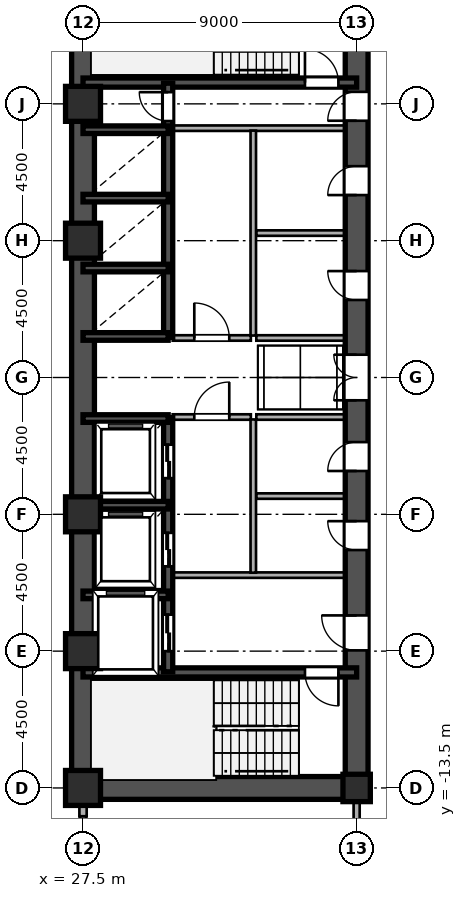
"""IFC4 building model, lengths in metres.
Left out: names, types, materials, properties, quantities, classifications, styles, units other than length and angle.
Written with IfcOpenShell. Run it as: python <this file> out.ifc"""

import sys

from ifc_helpers import new_model, si_unit, direction, frame, frame_2d, origin, origin_2d, place, context, subcontext, project, spatial, rectangle, hollow_rectangle, i_section, extrude, source, transform, mapped, element, fill, save


model = new_model("IFC4")
c1 = context("Model", 3, precision=1e-05, world=origin(), true_north=direction((0.0, 1.0)))
c2 = subcontext(c1, "Body", "Model", "MODEL_VIEW")
j1 = project(units=[si_unit("LENGTHUNIT", "METRE"), si_unit("PLANEANGLEUNIT", "RADIAN")], contexts=[c1])
p1 = place(None, origin())
s1 = spatial("IfcSite", under=j1, at=p1, CompositionType="ELEMENT")
p2 = place(p1, origin())
s2 = spatial("IfcBuilding", under=s1, at=p2, CompositionType="ELEMENT")
p3 = place(p2, frame((0.0, 0.0, 47.7)))
s3 = spatial("IfcBuildingStorey", under=s2, at=p3, CompositionType="ELEMENT", Elevation=47.7)
m1 = source(origin(), c2, "Body", "SweptSolid", [
    extrude(hollow_rectangle(XDim=1.15, YDim=1.15, WallThickness=0.048, at=origin_2d()), origin(), (0.0, 0.0, 1.0), 3.6),
])
for number, where, z_axis, x_axis in (
    (1, (27.5, -13.5, 0.0), (0.0, 0.0, 1.0), (1.0, 0.0, 0.0)),
    (2, (27.5, -9.0, 0.0), (0.0, 0.0, 1.0), (1.0, 0.0, 0.0)),
    (3, (27.5, -4.5, 0.0), (0.0, 0.0, 1.0), (1.0, 0.0, 0.0)),
    (4, (27.5, 4.5, 0.0), (0.0, 0.0, 1.0), (1.0, 0.0, 0.0)),
    (5, (27.5, 9.0, 0.0), (0.0, 0.0, 1.0), (1.0, 0.0, 0.0)),
):
    element("IfcColumn", number, at=place(p3, frame(where, z_axis=z_axis, x_axis=x_axis)), inside=s3, PredefinedType="COLUMN", context=c2, shape_type="MappedRepresentation", body=[
        mapped(m1, transform((0.0, 0.0, 0.0), scale=1.0)),
    ])
m2 = source(origin(), c2, "Body", "SweptSolid", [
    extrude(i_section(OverallWidth=0.9, OverallDepth=0.9, WebThickness=0.036, FlangeThickness=0.055, at=origin_2d()), origin(), (0.0, 0.0, 1.0), 3.6),
])
p4 = place(p3, frame((36.5, -13.5, 0.0), z_axis=(0.0, 0.0, 1.0), x_axis=(1.0, 0.0, 0.0)))
e6 = element("IfcColumn", 6, at=p4, inside=s3, PredefinedType="COLUMN", context=c2, shape_type="MappedRepresentation", body=[
    mapped(m2, transform((0.0, 0.0, 0.0), scale=1.0)),
])
p5 = place(p3, frame((27.5, -14.43, 0.0), z_axis=(0.0, 0.0, 1.0), x_axis=(0.0, 1.0, 0.0)))
e7 = element("IfcWall", 7, at=p5, inside=s3, PredefinedType="SOLIDWALL", context=c2, shape_type="SweptSolid", body=[
    extrude(rectangle(XDim=0.55, YDim=0.24, at=frame_2d((0.275, 0.0))), origin(), (0.0, 0.0, 1.0), 2.88),
])
for number, where, z_axis, x_axis in (
    (8, (27.5, -13.5, 0.0), (0.0, 0.0, 1.0), (0.0, 1.0, 0.0)),
    (9, (27.5, 1.3, 0.0), (0.0, 0.0, 1.0), (0.0, 1.0, 0.0)),
):
    element("IfcWall", number, at=place(p3, frame(where, z_axis=z_axis, x_axis=x_axis)), inside=s3, PredefinedType="SHEAR", context=c2, shape_type="SweptSolid", body=[
        extrude(rectangle(XDim=12.2, YDim=0.75, at=frame_2d((6.1, 0.0))), origin(), (0.0, 0.0, 1.0), 3.38),
    ])
p6 = place(p3, frame((27.5, -1.3, 0.0), z_axis=(0.0, 0.0, 1.0), x_axis=(0.0, 1.0, 0.0)))
e10 = element("IfcWall", 10, at=p6, inside=s3, PredefinedType="SHEAR", context=c2, shape_type="SweptSolid", body=[
    extrude(rectangle(XDim=2.6, YDim=0.75, at=frame_2d((1.3, 0.0))), origin(), (0.0, 0.0, 1.0), 3.38),
])
p7 = place(p3, frame((27.5, -13.5, 0.0), z_axis=(0.0, 0.0, 1.0), x_axis=(1.0, 0.0, 0.0)))
e11 = element("IfcWall", 11, at=p7, inside=s3, PredefinedType="SHEAR", context=c2, shape_type="SweptSolid", body=[
    extrude(rectangle(XDim=9.0, YDim=0.75, at=frame_2d((4.5, 0.0))), origin(), (0.0, 0.0, 1.0), 3.38),
])
p8 = place(p3, frame((36.5, -13.65, 0.0), z_axis=(0.0, 0.0, 1.0), x_axis=(0.0, 1.0, 0.0)))
e12 = element("IfcWall", 12, at=p8, inside=s3, PredefinedType="SHEAR", context=c2, shape_type="SweptSolid", body=[
    extrude(rectangle(XDim=7.15, YDim=0.75, at=frame_2d((3.575, 0.0))), origin(), (0.0, 0.0, 1.0), 3.38),
])
p9 = place(p8, frame((4.675, 0.0, 0.0)))
e13 = element("IfcOpeningElement", 13, at=p9, cuts=e12, PredefinedType="OPENING", context=c2, shape_type="SweptSolid", body=[
    extrude(rectangle(XDim=1.15, YDim=2.2, at=frame_2d((0.575, 1.1))), frame((0.0, 0.385, 0.0), z_axis=(0.0, -1.0, 0.0), x_axis=(1.0, 0.0, 0.0)), (0.0, 0.0, 1.0), 0.77),
])
p10 = place(p3, frame((36.5, -1.3, 0.0), z_axis=(0.0, 0.0, 1.0), x_axis=(0.0, 1.0, 0.0)))
e14 = element("IfcWall", 14, at=p10, inside=s3, PredefinedType="SHEAR", context=c2, shape_type="SweptSolid", body=[
    extrude(rectangle(XDim=2.6, YDim=0.75, at=frame_2d((1.3, 0.0))), origin(), (0.0, 0.0, 1.0), 3.38),
])
p11 = place(p10, frame((0.55, 0.0, 0.0)))
e15 = element("IfcOpeningElement", 15, at=p11, cuts=e14, PredefinedType="OPENING", context=c2, shape_type="SweptSolid", body=[
    extrude(rectangle(XDim=1.5, YDim=2.3, at=frame_2d((0.75, 1.15))), frame((0.0, 0.385, 0.0), z_axis=(0.0, -1.0, 0.0), x_axis=(1.0, 0.0, 0.0)), (0.0, 0.0, 1.0), 0.77),
])
p12 = place(p3, frame((36.5, 8.2, 0.0), z_axis=(0.0, 0.0, 1.0), x_axis=(0.0, 1.0, 0.0)))
e16 = element("IfcWall", 16, at=p12, inside=s3, PredefinedType="SHEAR", context=c2, shape_type="SweptSolid", body=[
    extrude(rectangle(XDim=5.45, YDim=0.75, at=frame_2d((2.725, 0.0))), origin(), (0.0, 0.0, 1.0), 3.38),
])
p13 = place(p12, frame((0.245, 0.0, 0.0)))
e17 = element("IfcOpeningElement", 17, at=p13, cuts=e16, PredefinedType="OPENING", context=c2, shape_type="SweptSolid", body=[
    extrude(rectangle(XDim=0.95, YDim=2.15, at=frame_2d((0.475, 1.075))), frame((0.0, 0.385, 0.0), z_axis=(0.0, -1.0, 0.0), x_axis=(1.0, 0.0, 0.0)), (0.0, 0.0, 1.0), 0.77),
])
p14 = place(p3, frame((36.5, -6.5, 0.0), z_axis=(0.0, 0.0, 1.0), x_axis=(0.0, 1.0, 0.0)))
e18 = element("IfcWall", 18, at=p14, inside=s3, PredefinedType="SHEAR", context=c2, shape_type="SweptSolid", body=[
    extrude(rectangle(XDim=2.6, YDim=0.75, at=frame_2d((1.3, 0.0))), origin(), (0.0, 0.0, 1.0), 3.38),
])
p15 = place(p14, frame((0.825, 0.0, 0.0)))
e19 = element("IfcOpeningElement", 19, at=p15, cuts=e18, PredefinedType="OPENING", context=c2, shape_type="SweptSolid", body=[
    extrude(rectangle(XDim=0.95, YDim=2.15, at=frame_2d((0.475, 1.075))), frame((0.0, 0.385, 0.0), z_axis=(0.0, -1.0, 0.0), x_axis=(1.0, 0.0, 0.0)), (0.0, 0.0, 1.0), 0.77),
])
p16 = place(p3, frame((36.5, -3.9, 0.0), z_axis=(0.0, 0.0, 1.0), x_axis=(0.0, 1.0, 0.0)))
e20 = element("IfcWall", 20, at=p16, inside=s3, PredefinedType="SHEAR", context=c2, shape_type="SweptSolid", body=[
    extrude(rectangle(XDim=2.6, YDim=0.75, at=frame_2d((1.3, 0.0))), origin(), (0.0, 0.0, 1.0), 3.38),
])
p17 = place(p16, frame((0.825, 0.0, 0.0)))
e21 = element("IfcOpeningElement", 21, at=p17, cuts=e20, PredefinedType="OPENING", context=c2, shape_type="SweptSolid", body=[
    extrude(rectangle(XDim=0.95, YDim=2.15, at=frame_2d((0.475, 1.075))), frame((0.0, 0.385, 0.0), z_axis=(0.0, -1.0, 0.0), x_axis=(1.0, 0.0, 0.0)), (0.0, 0.0, 1.0), 0.77),
])
p18 = place(p3, frame((36.5, 1.3, 0.0), z_axis=(0.0, 0.0, 1.0), x_axis=(0.0, 1.0, 0.0)))
e22 = element("IfcWall", 22, at=p18, inside=s3, PredefinedType="SHEAR", context=c2, shape_type="SweptSolid", body=[
    extrude(rectangle(XDim=3.45, YDim=0.75, at=frame_2d((1.725, 0.0))), origin(), (0.0, 0.0, 1.0), 3.38),
])
p19 = place(p18, frame((1.25, 0.0, 0.0)))
e23 = element("IfcOpeningElement", 23, at=p19, cuts=e22, PredefinedType="OPENING", context=c2, shape_type="SweptSolid", body=[
    extrude(rectangle(XDim=0.95, YDim=2.15, at=frame_2d((0.475, 1.075))), frame((0.0, 0.385, 0.0), z_axis=(0.0, -1.0, 0.0), x_axis=(1.0, 0.0, 0.0)), (0.0, 0.0, 1.0), 0.77),
])
p20 = place(p3, frame((36.5, 4.75, 0.0), z_axis=(0.0, 0.0, 1.0), x_axis=(0.0, 1.0, 0.0)))
e24 = element("IfcWall", 24, at=p20, inside=s3, PredefinedType="SHEAR", context=c2, shape_type="SweptSolid", body=[
    extrude(rectangle(XDim=3.45, YDim=0.75, at=frame_2d((1.725, 0.0))), origin(), (0.0, 0.0, 1.0), 3.38),
])
p21 = place(p20, frame((1.25, 0.0, 0.0)))
e25 = element("IfcOpeningElement", 25, at=p21, cuts=e24, PredefinedType="OPENING", context=c2, shape_type="SweptSolid", body=[
    extrude(rectangle(XDim=0.95, YDim=2.15, at=frame_2d((0.475, 1.075))), frame((0.0, 0.385, 0.0), z_axis=(0.0, -1.0, 0.0), x_axis=(1.0, 0.0, 0.0)), (0.0, 0.0, 1.0), 0.77),
])
p22 = place(p3, frame((27.5, -9.7, 0.0), z_axis=(0.0, 0.0, 1.0), x_axis=(1.0, 0.0, 0.0)))
e26 = element("IfcWall", 26, at=p22, inside=s3, PredefinedType="SHEAR", context=c2, shape_type="SweptSolid", body=[
    extrude(rectangle(XDim=9.0, YDim=0.3, at=frame_2d((4.5, 0.0))), origin(), (0.0, 0.0, 1.0), 3.38),
])
p23 = place(p22, frame((7.3, 0.0, 0.0)))
e27 = element("IfcOpeningElement", 27, at=p23, cuts=e26, PredefinedType="OPENING", context=c2, shape_type="SweptSolid", body=[
    extrude(rectangle(XDim=1.1, YDim=2.2, at=frame_2d((0.55, 1.1))), frame((0.0, 0.16, 0.0), z_axis=(0.0, -1.0, 0.0), x_axis=(1.0, 0.0, 0.0)), (0.0, 0.0, 1.0), 0.32),
])
p24 = place(p3, frame((27.5, 9.7, 0.0), z_axis=(0.0, 0.0, 1.0), x_axis=(1.0, 0.0, 0.0)))
e28 = element("IfcWall", 28, at=p24, inside=s3, PredefinedType="SHEAR", context=c2, shape_type="SweptSolid", body=[
    extrude(rectangle(XDim=9.0, YDim=0.3, at=frame_2d((4.5, 0.0))), origin(), (0.0, 0.0, 1.0), 3.38),
])
p25 = place(p24, frame((7.3, 0.0, 0.0)))
e29 = element("IfcOpeningElement", 29, at=p25, cuts=e28, PredefinedType="OPENING", context=c2, shape_type="SweptSolid", body=[
    extrude(rectangle(XDim=1.1, YDim=2.2, at=frame_2d((0.55, 1.1))), frame((0.0, 0.16, 0.0), z_axis=(0.0, -1.0, 0.0), x_axis=(1.0, 0.0, 0.0)), (0.0, 0.0, 1.0), 0.32),
])
for number, where, z_axis, x_axis in (
    (30, (27.5, -7.15, 0.0), (0.0, 0.0, 1.0), (1.0, 0.0, 0.0)),
    (31, (27.5, -4.2, 0.0), (0.0, 0.0, 1.0), (1.0, 0.0, 0.0)),
    (32, (27.5, -1.35, 0.0), (0.0, 0.0, 1.0), (1.0, 0.0, 0.0)),
    (33, (27.5, 1.35, 0.0), (0.0, 0.0, 1.0), (1.0, 0.0, 0.0)),
    (34, (27.5, 3.6, 0.0), (0.0, 0.0, 1.0), (1.0, 0.0, 0.0)),
    (35, (27.5, 5.9, 0.0), (0.0, 0.0, 1.0), (1.0, 0.0, 0.0)),
    (36, (27.5, 8.15, 0.0), (0.0, 0.0, 1.0), (1.0, 0.0, 0.0)),
):
    element("IfcWall", number, at=place(p3, frame(where, z_axis=z_axis, x_axis=x_axis)), inside=s3, PredefinedType="SHEAR", context=c2, shape_type="SweptSolid", body=[
        extrude(rectangle(XDim=2.8, YDim=0.25, at=frame_2d((1.4, 0.0))), origin(), (0.0, 0.0, 1.0), 3.38),
    ])
p26 = place(p3, frame((30.3, -9.68, 0.0), z_axis=(0.0, 0.0, 1.0), x_axis=(0.0, 1.0, 0.0)))
e37 = element("IfcWall", 37, at=p26, inside=s3, PredefinedType="SHEAR", context=c2, shape_type="SweptSolid", body=[
    extrude(rectangle(XDim=2.56, YDim=0.3, at=frame_2d((1.28, 0.0))), origin(), (0.0, 0.0, 1.0), 3.38),
])
p27 = place(p26, frame((0.68, 0.0, 0.0)))
e38 = element("IfcOpeningElement", 38, at=p27, cuts=e37, PredefinedType="OPENING", context=c2, shape_type="SweptSolid", body=[
    extrude(rectangle(XDim=1.2, YDim=2.25, at=frame_2d((0.6, 1.125))), frame((0.0, 0.16, 0.0), z_axis=(0.0, -1.0, 0.0), x_axis=(1.0, 0.0, 0.0)), (0.0, 0.0, 1.0), 0.32),
])
p28 = place(p3, frame((30.3, -7.12, 0.0), z_axis=(0.0, 0.0, 1.0), x_axis=(0.0, 1.0, 0.0)))
e39 = element("IfcWall", 39, at=p28, inside=s3, PredefinedType="SHEAR", context=c2, shape_type="SweptSolid", body=[
    extrude(rectangle(XDim=2.92, YDim=0.3, at=frame_2d((1.46, 0.0))), origin(), (0.0, 0.0, 1.0), 3.38),
])
p29 = place(p28, frame((0.91, 0.0, 0.0)))
e40 = element("IfcOpeningElement", 40, at=p29, cuts=e39, PredefinedType="OPENING", context=c2, shape_type="SweptSolid", body=[
    extrude(rectangle(XDim=1.1, YDim=2.2, at=frame_2d((0.55, 1.1))), frame((0.0, 0.16, 0.0), z_axis=(0.0, -1.0, 0.0), x_axis=(1.0, 0.0, 0.0)), (0.0, 0.0, 1.0), 0.32),
])
p30 = place(p3, frame((30.3, -4.2, 0.0), z_axis=(0.0, 0.0, 1.0), x_axis=(0.0, 1.0, 0.0)))
e41 = element("IfcWall", 41, at=p30, inside=s3, PredefinedType="SHEAR", context=c2, shape_type="SweptSolid", body=[
    extrude(rectangle(XDim=2.88, YDim=0.3, at=frame_2d((1.44, 0.0))), origin(), (0.0, 0.0, 1.0), 3.38),
])
p31 = place(p30, frame((0.89, 0.0, 0.0)))
e42 = element("IfcOpeningElement", 42, at=p31, cuts=e41, PredefinedType="OPENING", context=c2, shape_type="SweptSolid", body=[
    extrude(rectangle(XDim=1.1, YDim=2.2, at=frame_2d((0.55, 1.1))), frame((0.0, 0.16, 0.0), z_axis=(0.0, -1.0, 0.0), x_axis=(1.0, 0.0, 0.0)), (0.0, 0.0, 1.0), 0.32),
])
p32 = place(p3, frame((30.3, 1.32, 0.0), z_axis=(0.0, 0.0, 1.0), x_axis=(0.0, 1.0, 0.0)))
e43 = element("IfcWall", 43, at=p32, inside=s3, PredefinedType="SHEAR", context=c2, shape_type="SweptSolid", body=[
    extrude(rectangle(XDim=2.28, YDim=0.3, at=frame_2d((1.14, 0.0))), origin(), (0.0, 0.0, 1.0), 3.38),
])
p33 = place(p3, frame((30.3, 3.6, 0.0), z_axis=(0.0, 0.0, 1.0), x_axis=(0.0, 1.0, 0.0)))
e44 = element("IfcWall", 44, at=p33, inside=s3, PredefinedType="SHEAR", context=c2, shape_type="SweptSolid", body=[
    extrude(rectangle(XDim=2.3, YDim=0.3, at=frame_2d((1.15, 0.0))), origin(), (0.0, 0.0, 1.0), 3.38),
])
p34 = place(p3, frame((30.3, 5.9, 0.0), z_axis=(0.0, 0.0, 1.0), x_axis=(0.0, 1.0, 0.0)))
e45 = element("IfcWall", 45, at=p34, inside=s3, PredefinedType="SHEAR", context=c2, shape_type="SweptSolid", body=[
    extrude(rectangle(XDim=2.25, YDim=0.3, at=frame_2d((1.125, 0.0))), origin(), (0.0, 0.0, 1.0), 3.38),
])
p35 = place(p3, frame((30.3, 8.15, 0.0), z_axis=(0.0, 0.0, 1.0), x_axis=(0.0, 1.0, 0.0)))
e46 = element("IfcWall", 46, at=p35, inside=s3, PredefinedType="SHEAR", context=c2, shape_type="SweptSolid", body=[
    extrude(rectangle(XDim=1.53, YDim=0.3, at=frame_2d((0.765, 0.0))), origin(), (0.0, 0.0, 1.0), 3.38),
])
p36 = place(p35, frame((0.285, 0.0, 0.0)))
e47 = element("IfcOpeningElement", 47, at=p36, cuts=e46, PredefinedType="OPENING", context=c2, shape_type="SweptSolid", body=[
    extrude(rectangle(XDim=0.95, YDim=2.15, at=frame_2d((0.475, 1.075))), frame((0.0, 0.16, 0.0), z_axis=(0.0, -1.0, 0.0), x_axis=(1.0, 0.0, 0.0)), (0.0, 0.0, 1.0), 0.32),
])
for number, where, z_axis, x_axis in (
    (48, (30.45, -6.5, 0.0), (0.0, 0.0, 1.0), (1.0, 0.0, 0.0)),
    (49, (30.45, 8.2, 0.0), (0.0, 0.0, 1.0), (1.0, 0.0, 0.0)),
):
    element("IfcWall", number, at=place(p3, frame(where, z_axis=z_axis, x_axis=x_axis)), inside=s3, PredefinedType="PARTITIONING", context=c2, shape_type="SweptSolid", body=[
        extrude(rectangle(XDim=5.7, YDim=0.18, at=frame_2d((2.85, 0.0))), origin(), (0.0, 0.0, 1.0), 3.38),
    ])
p37 = place(p3, frame((33.1, -6.42, 0.0), z_axis=(0.0, 0.0, 1.0), x_axis=(0.0, 1.0, 0.0)))
e50 = element("IfcWall", 50, at=p37, inside=s3, PredefinedType="PARTITIONING", context=c2, shape_type="SweptSolid", body=[
    extrude(rectangle(XDim=5.04, YDim=0.18, at=frame_2d((2.52, 0.0))), origin(), (0.0, 0.0, 1.0), 3.38),
])
p38 = place(p3, frame((33.1, 1.38, 0.0), z_axis=(0.0, 0.0, 1.0), x_axis=(0.0, 1.0, 0.0)))
e51 = element("IfcWall", 51, at=p38, inside=s3, PredefinedType="PARTITIONING", context=c2, shape_type="SweptSolid", body=[
    extrude(rectangle(XDim=6.74, YDim=0.18, at=frame_2d((3.37, 0.0))), origin(), (0.0, 0.0, 1.0), 3.38),
])
p39 = place(p3, frame((30.45, -1.3, 0.0), z_axis=(0.0, 0.0, 1.0), x_axis=(1.0, 0.0, 0.0)))
e52 = element("IfcWall", 52, at=p39, inside=s3, PredefinedType="PARTITIONING", context=c2, shape_type="SweptSolid", body=[
    extrude(rectangle(XDim=2.57, YDim=0.18, at=frame_2d((1.285, 0.0))), origin(), (0.0, 0.0, 1.0), 3.38),
])
p40 = place(p39, frame((0.71, 0.0, 0.0)))
e53 = element("IfcOpeningElement", 53, at=p40, cuts=e52, PredefinedType="OPENING", context=c2, shape_type="SweptSolid", body=[
    extrude(rectangle(XDim=1.15, YDim=2.2, at=frame_2d((0.575, 1.1))), frame((0.0, 0.1, 0.0), z_axis=(0.0, -1.0, 0.0), x_axis=(1.0, 0.0, 0.0)), (0.0, 0.0, 1.0), 0.2),
])
p41 = place(p3, frame((30.45, 1.3, 0.0), z_axis=(0.0, 0.0, 1.0), x_axis=(1.0, 0.0, 0.0)))
e54 = element("IfcWall", 54, at=p41, inside=s3, PredefinedType="PARTITIONING", context=c2, shape_type="SweptSolid", body=[
    extrude(rectangle(XDim=2.57, YDim=0.18, at=frame_2d((1.285, 0.0))), origin(), (0.0, 0.0, 1.0), 3.38),
])
p42 = place(p41, frame((0.71, 0.0, 0.0)))
e55 = element("IfcOpeningElement", 55, at=p42, cuts=e54, PredefinedType="OPENING", context=c2, shape_type="SweptSolid", body=[
    extrude(rectangle(XDim=1.15, YDim=2.2, at=frame_2d((0.575, 1.1))), frame((0.0, 0.1, 0.0), z_axis=(0.0, -1.0, 0.0), x_axis=(1.0, 0.0, 0.0)), (0.0, 0.0, 1.0), 0.2),
])
for number, where, z_axis, x_axis in (
    (56, (33.2, -1.3, 0.0), (0.0, 0.0, 1.0), (1.0, 0.0, 0.0)),
    (57, (33.2, 1.3, 0.0), (0.0, 0.0, 1.0), (1.0, 0.0, 0.0)),
    (58, (33.2, -3.9, 0.0), (0.0, 0.0, 1.0), (1.0, 0.0, 0.0)),
    (59, (33.2, 4.75, 0.0), (0.0, 0.0, 1.0), (1.0, 0.0, 0.0)),
):
    element("IfcWall", number, at=place(p3, frame(where, z_axis=z_axis, x_axis=x_axis)), inside=s3, PredefinedType="PARTITIONING", context=c2, shape_type="SweptSolid", body=[
        extrude(rectangle(XDim=2.95, YDim=0.18, at=frame_2d((1.475, 0.0))), origin(), (0.0, 0.0, 1.0), 3.38),
    ])
p43 = place(p3, frame((36.5, -15.515, 0.0), z_axis=(0.0, 0.0, 1.0), x_axis=(0.0, 1.0, 0.0)))
e60 = element("IfcWall", 60, at=p43, inside=s3, PredefinedType="PARTITIONING", context=c2, shape_type="SweptSolid", body=[
    extrude(rectangle(XDim=1.635, YDim=0.2, at=frame_2d((0.817, 0.0))), origin(), (0.0, 0.0, 1.0), 2.68),
])
m3 = source(origin(), c2, "Body", "SweptSolid", [
    extrude(rectangle(XDim=1.15, YDim=2.2, at=frame_2d((0.575, 1.1))), frame((0.0, 0.025, 0.0), z_axis=(0.0, -1.0, 0.0), x_axis=(1.0, 0.0, 0.0)), (0.0, 0.0, 1.0), 0.05),
])
p44 = place(p9, origin())
e61 = element("IfcDoor", 61, at=p44, inside=s3, OperationType="SINGLE_SWING_RIGHT", PredefinedType="DOOR", context=c2, shape_type="MappedRepresentation", body=[
    mapped(m3, transform((0.0, 0.0, 0.0), scale=1.0)),
])
fill(e13, e61)
m4 = source(origin(), c2, "Body", "SweptSolid", [
    extrude(rectangle(XDim=1.5, YDim=2.3, at=frame_2d((0.75, 1.15))), frame((0.0, 0.025, 0.0), z_axis=(0.0, -1.0, 0.0), x_axis=(1.0, 0.0, 0.0)), (0.0, 0.0, 1.0), 0.05),
])
p45 = place(p11, origin())
e62 = element("IfcDoor", 62, at=p45, inside=s3, OperationType="DOUBLE_SWING_LEFT", PredefinedType="DOOR", context=c2, shape_type="MappedRepresentation", body=[
    mapped(m4, transform((0.0, 0.0, 0.0), scale=1.0)),
])
fill(e15, e62)
m5 = source(origin(), c2, "Body", "SweptSolid", [
    extrude(rectangle(XDim=0.95, YDim=2.15, at=frame_2d((0.475, 1.075))), frame((0.0, 0.025, 0.0), z_axis=(0.0, -1.0, 0.0), x_axis=(1.0, 0.0, 0.0)), (0.0, 0.0, 1.0), 0.05),
])
p46 = place(p13, origin())
e63 = element("IfcDoor", 63, at=p46, inside=s3, OperationType="SINGLE_SWING_LEFT", PredefinedType="DOOR", context=c2, shape_type="MappedRepresentation", body=[
    mapped(m5, transform((0.0, 0.0, 0.0), scale=1.0)),
])
fill(e17, e63)
p47 = place(p15, origin())
e64 = element("IfcDoor", 64, at=p47, inside=s3, OperationType="SINGLE_SWING_RIGHT", PredefinedType="DOOR", context=c2, shape_type="MappedRepresentation", body=[
    mapped(m5, transform((0.0, 0.0, 0.0), scale=1.0)),
])
fill(e19, e64)
p48 = place(p17, origin())
e65 = element("IfcDoor", 65, at=p48, inside=s3, OperationType="SINGLE_SWING_LEFT", PredefinedType="DOOR", context=c2, shape_type="MappedRepresentation", body=[
    mapped(m5, transform((0.0, 0.0, 0.0), scale=1.0)),
])
fill(e21, e65)
p49 = place(p19, origin())
e66 = element("IfcDoor", 66, at=p49, inside=s3, OperationType="SINGLE_SWING_RIGHT", PredefinedType="DOOR", context=c2, shape_type="MappedRepresentation", body=[
    mapped(m5, transform((0.0, 0.0, 0.0), scale=1.0)),
])
fill(e23, e66)
p50 = place(p21, origin())
e67 = element("IfcDoor", 67, at=p50, inside=s3, OperationType="SINGLE_SWING_LEFT", PredefinedType="DOOR", context=c2, shape_type="MappedRepresentation", body=[
    mapped(m5, transform((0.0, 0.0, 0.0), scale=1.0)),
])
fill(e25, e67)
m6 = source(origin(), c2, "Body", "SweptSolid", [
    extrude(rectangle(XDim=1.1, YDim=2.2, at=frame_2d((0.55, 1.1))), frame((0.0, 0.025, 0.0), z_axis=(0.0, -1.0, 0.0), x_axis=(1.0, 0.0, 0.0)), (0.0, 0.0, 1.0), 0.05),
])
p51 = place(p23, frame((1.1, 0.0, 0.0), z_axis=(0.0, 0.0, 1.0), x_axis=(-1.0, 0.0, 0.0)))
e68 = element("IfcDoor", 68, at=p51, inside=s3, OperationType="SINGLE_SWING_RIGHT", PredefinedType="DOOR", context=c2, shape_type="MappedRepresentation", body=[
    mapped(m6, transform((0.0, 0.0, 0.0), scale=1.0)),
])
fill(e27, e68)
p52 = place(p25, origin())
e69 = element("IfcDoor", 69, at=p52, inside=s3, OperationType="SINGLE_SWING_LEFT", PredefinedType="DOOR", context=c2, shape_type="MappedRepresentation", body=[
    mapped(m6, transform((0.0, 0.0, 0.0), scale=1.0)),
])
fill(e29, e69)
m7 = source(origin(), c2, "Body", "SweptSolid", [
    extrude(rectangle(XDim=1.2, YDim=2.25, at=frame_2d((0.6, 1.125))), frame((0.0, 0.025, 0.0), z_axis=(0.0, -1.0, 0.0), x_axis=(1.0, 0.0, 0.0)), (0.0, 0.0, 1.0), 0.05),
])
p53 = place(p27, origin())
e70 = element("IfcDoor", 70, at=p53, inside=s3, OperationType="DOUBLE_DOOR_SLIDING", PredefinedType="DOOR", context=c2, shape_type="MappedRepresentation", body=[
    mapped(m7, transform((0.0, 0.0, 0.0), scale=1.0)),
])
fill(e38, e70)
m8 = source(origin(), c2, "Body", "SweptSolid", [
    extrude(rectangle(XDim=1.1, YDim=2.2, at=frame_2d((0.55, 1.1))), frame((0.0, 0.025, 0.0), z_axis=(0.0, -1.0, 0.0), x_axis=(1.0, 0.0, 0.0)), (0.0, 0.0, 1.0), 0.05),
])
p54 = place(p29, origin())
e71 = element("IfcDoor", 71, at=p54, inside=s3, OperationType="DOUBLE_DOOR_SLIDING", PredefinedType="DOOR", context=c2, shape_type="MappedRepresentation", body=[
    mapped(m8, transform((0.0, 0.0, 0.0), scale=1.0)),
])
fill(e40, e71)
p55 = place(p31, origin())
e72 = element("IfcDoor", 72, at=p55, inside=s3, OperationType="DOUBLE_DOOR_SLIDING", PredefinedType="DOOR", context=c2, shape_type="MappedRepresentation", body=[
    mapped(m8, transform((0.0, 0.0, 0.0), scale=1.0)),
])
fill(e42, e72)
p56 = place(p36, origin())
e73 = element("IfcDoor", 73, at=p56, inside=s3, OperationType="SINGLE_SWING_RIGHT", PredefinedType="DOOR", context=c2, shape_type="MappedRepresentation", body=[
    mapped(m5, transform((0.0, 0.0, 0.0), scale=1.0)),
])
fill(e47, e73)
p57 = place(p40, origin())
e74 = element("IfcDoor", 74, at=p57, inside=s3, OperationType="SINGLE_SWING_RIGHT", PredefinedType="DOOR", context=c2, shape_type="MappedRepresentation", body=[
    mapped(m3, transform((0.0, 0.0, 0.0), scale=1.0)),
])
fill(e53, e74)
p58 = place(p42, origin())
e75 = element("IfcDoor", 75, at=p58, inside=s3, OperationType="SINGLE_SWING_LEFT", PredefinedType="DOOR", context=c2, shape_type="MappedRepresentation", body=[
    mapped(m3, transform((0.0, 0.0, 0.0), scale=1.0)),
])
fill(e55, e75)
save(model, sys.argv[1])
